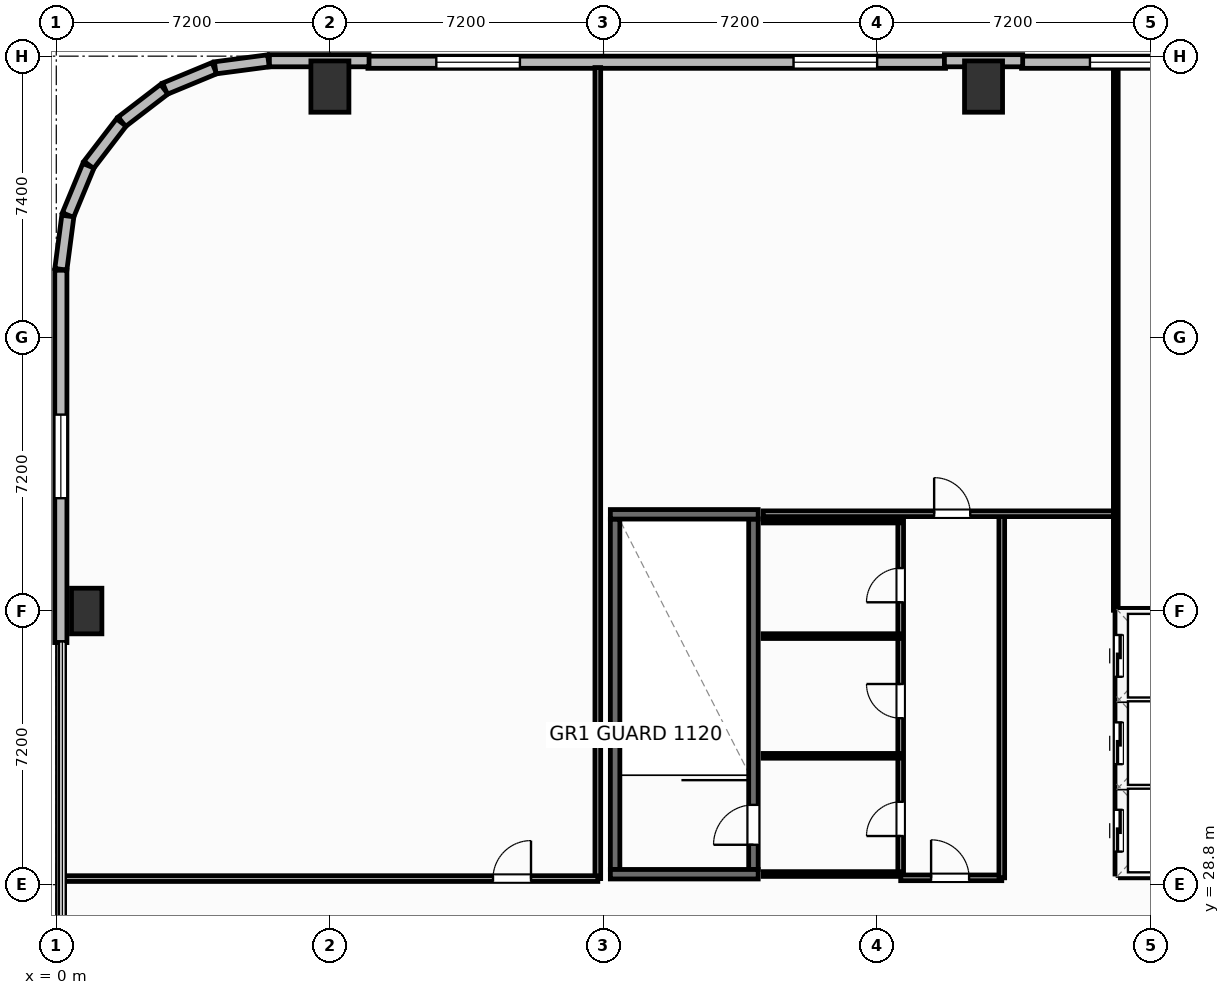
"""IFC4 building model, lengths in metres.
Left out: names, types, materials, properties, quantities, classifications, styles, units other than length and angle.
Written with IfcOpenShell. Run it as: python <this file> out.ifc"""

import sys

from ifc_helpers import new_model, si_unit, direction, frame, frame_2d, origin, origin_2d, place, context, subcontext, project, spatial, rectangle, extrude, element, fill, save


model = new_model("IFC4")
c1 = context("Model", 3, precision=1e-05, world=origin(), true_north=direction((0.0, 1.0)))
c2 = subcontext(c1, "Body", "Model", "MODEL_VIEW")
j1 = project(units=[si_unit("LENGTHUNIT", "METRE"), si_unit("PLANEANGLEUNIT", "RADIAN")], contexts=[c1])
p1 = place(None, origin())
s1 = spatial("IfcSite", under=j1, at=p1, CompositionType="ELEMENT")
p2 = place(p1, origin())
s2 = spatial("IfcBuilding", under=s1, at=p2, CompositionType="ELEMENT")
p3 = place(p2, frame((0.0, 0.0, 21.6)))
s3 = spatial("IfcBuildingStorey", under=s2, at=p3, CompositionType="ELEMENT", Elevation=21.6)
p4 = place(p3, frame((14.705, 29.2, 0.0), z_axis=(0.0, 0.0, 1.0), x_axis=(0.0, 1.0, 0.0)))
e1 = element("IfcWall", 1, at=p4, inside=s3, PredefinedType="SHEAR", context=c2, shape_type="SweptSolid", body=[
    extrude(rectangle(XDim=9.22, YDim=0.25, at=frame_2d((4.61, 0.0))), origin(), (0.0, 0.0, 1.0), 5.15),
])
p5 = place(p3, frame((18.345, 29.2, 0.0), z_axis=(0.0, 0.0, 1.0), x_axis=(0.0, 1.0, 0.0)))
e2 = element("IfcWall", 2, at=p5, inside=s3, PredefinedType="SHEAR", context=c2, shape_type="SweptSolid", body=[
    extrude(rectangle(XDim=9.22, YDim=0.25, at=frame_2d((4.61, 0.0))), origin(), (0.0, 0.0, 1.0), 5.15),
])
p6 = place(p5, frame((0.65, 0.0, 0.0)))
e3 = element("IfcOpeningElement", 3, at=p6, cuts=e2, PredefinedType="OPENING", context=c2, shape_type="SweptSolid", body=[
    extrude(rectangle(XDim=1.05, YDim=2.15, at=frame_2d((0.525, 1.075))), frame((0.0, 0.135, 0.0), z_axis=(0.0, -1.0, 0.0), x_axis=(1.0, 0.0, 0.0)), (0.0, 0.0, 1.0), 0.27),
])
for number, where, z_axis, x_axis in (
    (4, (14.58, 38.545, 0.0), (0.0, 0.0, 1.0), (1.0, 0.0, 0.0)),
    (5, (14.58, 29.075, 0.0), (0.0, 0.0, 1.0), (1.0, 0.0, 0.0)),
):
    element("IfcWall", number, at=place(p3, frame(where, z_axis=z_axis, x_axis=x_axis)), inside=s3, PredefinedType="SHEAR", context=c2, shape_type="SweptSolid", body=[
        extrude(rectangle(XDim=3.89, YDim=0.25, at=frame_2d((1.945, 0.0))), origin(), (0.0, 0.0, 1.0), 5.15),
    ])
for number, where, z_axis, x_axis in (
    (6, (7.2, 49.8, 0.0), (0.0, 0.0, 1.0), (1.0, 0.0, 0.0)),
    (7, (24.4, 49.8, 0.0), (0.0, 0.0, 1.0), (1.0, 0.0, 0.0)),
):
    element("IfcColumn", number, at=place(p3, frame(where, z_axis=z_axis, x_axis=x_axis)), inside=s3, PredefinedType="COLUMN", context=c2, shape_type="SweptSolid", body=[
        extrude(rectangle(XDim=1.0, YDim=1.35, at=origin_2d()), origin(), (0.0, 0.0, 1.0), 5.4),
    ])
p7 = place(p3, frame((0.8, 36.0, 0.0), z_axis=(0.0, 0.0, 1.0), x_axis=(1.0, 0.0, 0.0)))
e8 = element("IfcColumn", 8, at=p7, inside=s3, PredefinedType="PILASTER", context=c2, shape_type="SweptSolid", body=[
    extrude(rectangle(XDim=0.8, YDim=1.2, at=origin_2d()), origin(), (0.0, 0.0, 1.0), 5.4),
])
p8 = place(p3, frame((8.2, 50.44, 0.0), z_axis=(0.0, 0.0, 1.0), x_axis=(1.0, 0.0, 0.0)))
e9 = element("IfcWall", 9, at=p8, inside=s3, PredefinedType="SOLIDWALL", context=c2, shape_type="SweptSolid", body=[
    extrude(rectangle(XDim=15.2, YDim=0.32, at=frame_2d((7.6, 0.0))), origin(), (0.0, 0.0, 1.0), 4.1),
])
p9 = place(p8, frame((1.8, 0.0, 0.8)))
e10 = element("IfcOpeningElement", 10, at=p9, cuts=e9, PredefinedType="OPENING", context=c2, shape_type="SweptSolid", body=[
    extrude(rectangle(XDim=2.2, YDim=1.11, at=frame_2d((1.1, 0.555))), frame((0.0, 0.17, 0.0), z_axis=(0.0, -1.0, 0.0), x_axis=(1.0, 0.0, 0.0)), (0.0, 0.0, 1.0), 0.34),
])
p10 = place(p8, frame((11.2, 0.0, 0.8)))
e11 = element("IfcOpeningElement", 11, at=p10, cuts=e9, PredefinedType="OPENING", context=c2, shape_type="SweptSolid", body=[
    extrude(rectangle(XDim=2.2, YDim=1.11, at=frame_2d((1.1, 0.555))), frame((0.0, 0.17, 0.0), z_axis=(0.0, -1.0, 0.0), x_axis=(1.0, 0.0, 0.0)), (0.0, 0.0, 1.0), 0.34),
])
p11 = place(p3, frame((25.4, 50.44, 0.0), z_axis=(0.0, 0.0, 1.0), x_axis=(1.0, 0.0, 0.0)))
e12 = element("IfcWall", 12, at=p11, inside=s3, PredefinedType="SOLIDWALL", context=c2, shape_type="SweptSolid", body=[
    extrude(rectangle(XDim=27.6, YDim=0.32, at=frame_2d((13.8, 0.0))), origin(), (0.0, 0.0, 1.0), 4.1),
])
p12 = place(p11, frame((1.8, 0.0, 0.8)))
e13 = element("IfcOpeningElement", 13, at=p12, cuts=e12, PredefinedType="OPENING", context=c2, shape_type="SweptSolid", body=[
    extrude(rectangle(XDim=2.2, YDim=1.11, at=frame_2d((1.1, 0.555))), frame((0.0, 0.17, 0.0), z_axis=(0.0, -1.0, 0.0), x_axis=(1.0, 0.0, 0.0)), (0.0, 0.0, 1.0), 0.34),
])
p13 = place(p11, frame((23.6, 0.0, 0.8)))
e14 = element("IfcOpeningElement", 14, at=p13, cuts=e12, PredefinedType="OPENING", context=c2, shape_type="SweptSolid", body=[
    extrude(rectangle(XDim=2.2, YDim=1.11, at=frame_2d((1.1, 0.555))), frame((0.0, 0.17, 0.0), z_axis=(0.0, -1.0, 0.0), x_axis=(1.0, 0.0, 0.0)), (0.0, 0.0, 1.0), 0.34),
])
p14 = place(p3, frame((25.43, 50.48, 0.0), z_axis=(0.0, 0.0, 1.0), x_axis=(-1.0, 0.0, 0.0)))
e15 = element("IfcWall", 15, at=p14, inside=s3, PredefinedType="SOLIDWALL", context=c2, shape_type="SweptSolid", body=[
    extrude(rectangle(XDim=2.06, YDim=0.32, at=frame_2d((1.03, 0.0))), origin(), (0.0, 0.0, 1.0), 4.1),
])
p15 = place(p3, frame((8.23, 50.48, 0.0), z_axis=(0.0, 0.0, 1.0), x_axis=(-1.0, 0.0, 0.0)))
e16 = element("IfcWall", 16, at=p15, inside=s3, PredefinedType="SOLIDWALL", context=c2, shape_type="SweptSolid", body=[
    extrude(rectangle(XDim=2.622, YDim=0.32, at=frame_2d((1.311, 0.0))), origin(), (0.0, 0.0, 1.0), 4.1),
])
p16 = place(p3, frame((5.583, 50.477, 0.0), z_axis=(0.0, 0.0, 1.0), x_axis=(-0.991434880626, -0.130601981138, 0.0)))
e17 = element("IfcWall", 17, at=p16, inside=s3, PredefinedType="SOLIDWALL", context=c2, shape_type="SweptSolid", body=[
    extrude(rectangle(XDim=1.413, YDim=0.32, at=frame_2d((0.707, 0.0))), origin(), (0.0, 0.0, 1.0), 4.1),
])
p17 = place(p3, frame((4.159, 50.283, 0.0), z_axis=(0.0, 0.0, 1.0), x_axis=(-0.923841042178, -0.382776343035, 0.0)))
e18 = element("IfcWall", 18, at=p17, inside=s3, PredefinedType="SOLIDWALL", context=c2, shape_type="SweptSolid", body=[
    extrude(rectangle(XDim=1.405, YDim=0.32, at=frame_2d((0.703, 0.0))), origin(), (0.0, 0.0, 1.0), 4.1),
])
p18 = place(p3, frame((2.841, 49.73, 0.0), z_axis=(0.0, 0.0, 1.0), x_axis=(-0.79338541907, -0.60871962085, 0.0)))
e19 = element("IfcWall", 19, at=p18, inside=s3, PredefinedType="SOLIDWALL", context=c2, shape_type="SweptSolid", body=[
    extrude(rectangle(XDim=1.405, YDim=0.32, at=frame_2d((0.703, 0.0))), origin(), (0.0, 0.0, 1.0), 4.1),
])
p19 = place(p3, frame((1.711, 48.854, 0.0), z_axis=(0.0, 0.0, 1.0), x_axis=(-0.608828954222, -0.793301521807, 0.0)))
e20 = element("IfcWall", 20, at=p19, inside=s3, PredefinedType="SOLIDWALL", context=c2, shape_type="SweptSolid", body=[
    extrude(rectangle(XDim=1.406, YDim=0.32, at=frame_2d((0.703, 0.0))), origin(), (0.0, 0.0, 1.0), 4.1),
])
p20 = place(p3, frame((0.846, 47.716, 0.0), z_axis=(0.0, 0.0, 1.0), x_axis=(-0.382924622758, -0.923779591291, 0.0)))
e21 = element("IfcWall", 21, at=p20, inside=s3, PredefinedType="SOLIDWALL", context=c2, shape_type="SweptSolid", body=[
    extrude(rectangle(XDim=1.405, YDim=0.32, at=frame_2d((0.703, 0.0))), origin(), (0.0, 0.0, 1.0), 4.1),
])
p21 = place(p3, frame((0.304, 46.393, 0.0), z_axis=(0.0, 0.0, 1.0), x_axis=(-0.130432168094, -0.991457235349, 0.0)))
e22 = element("IfcWall", 22, at=p21, inside=s3, PredefinedType="SOLIDWALL", context=c2, shape_type="SweptSolid", body=[
    extrude(rectangle(XDim=1.413, YDim=0.32, at=frame_2d((0.707, 0.0))), origin(), (0.0, 0.0, 1.0), 4.1),
])
p22 = place(p3, frame((0.12, 44.967, 0.0), z_axis=(0.0, 0.0, 1.0), x_axis=(0.0, -1.0, 0.0)))
e23 = element("IfcWall", 23, at=p22, inside=s3, PredefinedType="SOLIDWALL", context=c2, shape_type="SweptSolid", body=[
    extrude(rectangle(XDim=9.797, YDim=0.32, at=frame_2d((4.898, 0.0))), origin(), (0.0, 0.0, 1.0), 4.1),
])
p23 = place(p22, frame((3.799, 0.0, 0.8)))
e24 = element("IfcOpeningElement", 24, at=p23, cuts=e23, PredefinedType="OPENING", context=c2, shape_type="SweptSolid", body=[
    extrude(rectangle(XDim=2.2, YDim=2.0, at=frame_2d((1.1, 1.0))), frame((0.0, 0.17, 0.0), z_axis=(0.0, -1.0, 0.0), x_axis=(1.0, 0.0, 0.0)), (0.0, 0.0, 1.0), 0.34),
])
p24 = place(p3, frame((22.22, 28.98, 0.0), z_axis=(0.0, 0.0, 1.0), x_axis=(1.0, 0.0, 0.0)))
e25 = element("IfcWall", 25, at=p24, inside=s3, PredefinedType="PARTITIONING", context=c2, shape_type="SweptSolid", body=[
    extrude(rectangle(XDim=2.66, YDim=0.15, at=frame_2d((1.33, 0.0))), origin(), (0.0, 0.0, 1.0), 5.15),
])
p25 = place(p24, frame((0.8, 0.0, 0.0)))
e26 = element("IfcOpeningElement", 26, at=p25, cuts=e25, PredefinedType="OPENING", context=c2, shape_type="SweptSolid", body=[
    extrude(rectangle(XDim=1.0, YDim=2.05, at=frame_2d((0.5, 1.025))), frame((0.0, 0.085, 0.0), z_axis=(0.0, -1.0, 0.0), x_axis=(1.0, 0.0, 0.0)), (0.0, 0.0, 1.0), 0.17),
])
p26 = place(p3, frame((24.88, 28.98, 0.0), z_axis=(0.0, 0.0, 1.0), x_axis=(0.0, 1.0, 0.0)))
e27 = element("IfcWall", 27, at=p26, inside=s3, PredefinedType="PARTITIONING", context=c2, shape_type="SweptSolid", body=[
    extrude(rectangle(XDim=9.58, YDim=0.15, at=frame_2d((4.79, 0.0))), origin(), (0.0, 0.0, 1.0), 5.15),
])
p27 = place(p3, frame((22.22, 29.08, 0.0), z_axis=(0.0, 0.0, 1.0), x_axis=(0.0, 1.0, 0.0)))
e28 = element("IfcWall", 28, at=p27, inside=s3, PredefinedType="PARTITIONING", context=c2, shape_type="SweptSolid", body=[
    extrude(rectangle(XDim=9.3, YDim=0.15, at=frame_2d((4.65, 0.0))), origin(), (0.0, 0.0, 1.0), 5.15),
])
p28 = place(p27, frame((1.0, 0.0, 0.0)))
e29 = element("IfcOpeningElement", 29, at=p28, cuts=e28, PredefinedType="OPENING", context=c2, shape_type="SweptSolid", body=[
    extrude(rectangle(XDim=0.9, YDim=2.05, at=frame_2d((0.45, 1.025))), frame((0.0, 0.085, 0.0), z_axis=(0.0, -1.0, 0.0), x_axis=(1.0, 0.0, 0.0)), (0.0, 0.0, 1.0), 0.17),
])
p29 = place(p27, frame((4.1, 0.0, 0.0)))
e30 = element("IfcOpeningElement", 30, at=p29, cuts=e28, PredefinedType="OPENING", context=c2, shape_type="SweptSolid", body=[
    extrude(rectangle(XDim=0.9, YDim=2.05, at=frame_2d((0.45, 1.025))), frame((0.0, 0.085, 0.0), z_axis=(0.0, -1.0, 0.0), x_axis=(1.0, 0.0, 0.0)), (0.0, 0.0, 1.0), 0.17),
])
p30 = place(p27, frame((7.15, 0.0, 0.0)))
e31 = element("IfcOpeningElement", 31, at=p30, cuts=e28, PredefinedType="OPENING", context=c2, shape_type="SweptSolid", body=[
    extrude(rectangle(XDim=0.9, YDim=2.05, at=frame_2d((0.45, 1.025))), frame((0.0, 0.085, 0.0), z_axis=(0.0, -1.0, 0.0), x_axis=(1.0, 0.0, 0.0)), (0.0, 0.0, 1.0), 0.17),
])
for number, where, z_axis, x_axis in (
    (32, (18.6, 29.08, 0.0), (0.0, 0.0, 1.0), (1.0, 0.0, 0.0)),
    (33, (18.6, 32.19, 0.0), (0.0, 0.0, 1.0), (1.0, 0.0, 0.0)),
    (34, (18.6, 35.34, 0.0), (0.0, 0.0, 1.0), (1.0, 0.0, 0.0)),
    (35, (18.6, 38.38, 0.0), (0.0, 0.0, 1.0), (1.0, 0.0, 0.0)),
):
    element("IfcWall", number, at=place(p3, frame(where, z_axis=z_axis, x_axis=x_axis)), inside=s3, PredefinedType="PARTITIONING", context=c2, shape_type="SweptSolid", body=[
        extrude(rectangle(XDim=3.62, YDim=0.125, at=frame_2d((1.81, 0.0))), origin(), (0.0, 0.0, 1.0), 5.15),
    ])
p31 = place(p3, frame((18.6, 38.56, 0.0), z_axis=(0.0, 0.0, 1.0), x_axis=(1.0, 0.0, 0.0)))
e36 = element("IfcWall", 36, at=p31, inside=s3, PredefinedType="PARTITIONING", context=c2, shape_type="SweptSolid", body=[
    extrude(rectangle(XDim=9.28, YDim=0.15, at=frame_2d((4.64, 0.0))), origin(), (0.0, 0.0, 1.0), 5.15),
])
p32 = place(p31, frame((4.5, 0.0, 0.0)))
e37 = element("IfcOpeningElement", 37, at=p32, cuts=e36, PredefinedType="OPENING", context=c2, shape_type="SweptSolid", body=[
    extrude(rectangle(XDim=0.95, YDim=2.05, at=frame_2d((0.475, 1.025))), frame((0.0, 0.085, 0.0), z_axis=(0.0, -1.0, 0.0), x_axis=(1.0, 0.0, 0.0)), (0.0, 0.0, 1.0), 0.17),
])
p33 = place(p3, frame((27.88, 36.02, 0.0), z_axis=(0.0, 0.0, 1.0), x_axis=(0.0, 1.0, 0.0)))
e38 = element("IfcWall", 38, at=p33, inside=s3, PredefinedType="PARTITIONING", context=c2, shape_type="SweptSolid", body=[
    extrude(rectangle(XDim=14.18, YDim=0.125, at=frame_2d((7.09, 0.0))), origin(), (0.0, 0.0, 1.0), 5.15),
])
p34 = place(p3, frame((14.25, 28.96, 0.0), z_axis=(0.0, 0.0, 1.0), x_axis=(0.0, 1.0, 0.0)))
e39 = element("IfcWall", 39, at=p34, inside=s3, PredefinedType="PARTITIONING", context=c2, shape_type="SweptSolid", body=[
    extrude(rectangle(XDim=21.34, YDim=0.15, at=frame_2d((10.67, 0.0))), origin(), (0.0, 0.0, 1.0), 5.15),
])
p35 = place(p3, frame((0.2, 28.96, 0.0), z_axis=(0.0, 0.0, 1.0), x_axis=(1.0, 0.0, 0.0)))
e40 = element("IfcWall", 40, at=p35, inside=s3, PredefinedType="PARTITIONING", context=c2, shape_type="SweptSolid", body=[
    extrude(rectangle(XDim=14.05, YDim=0.15, at=frame_2d((7.025, 0.0))), origin(), (0.0, 0.0, 1.0), 5.15),
])
p36 = place(p35, frame((11.292, 0.0, 0.0)))
e41 = element("IfcOpeningElement", 41, at=p36, cuts=e40, PredefinedType="OPENING", context=c2, shape_type="SweptSolid", body=[
    extrude(rectangle(XDim=1.0, YDim=2.05, at=frame_2d((0.5, 1.025))), frame((0.0, 0.085, 0.0), z_axis=(0.0, -1.0, 0.0), x_axis=(1.0, 0.0, 0.0)), (0.0, 0.0, 1.0), 0.17),
])
for number, where, z_axis, x_axis in (
    (42, (28.02, 31.375, 0.0), (0.0, 0.0, 1.0), (1.0, 0.0, 0.0)),
    (43, (28.02, 33.675, 0.0), (0.0, 0.0, 1.0), (1.0, 0.0, 0.0)),
):
    element("IfcWall", number, at=place(p3, frame(where, z_axis=z_axis, x_axis=x_axis)), inside=s3, PredefinedType="PARTITIONING", context=c2, shape_type="SweptSolid", body=[
        extrude(rectangle(XDim=2.06, YDim=0.2, at=frame_2d((1.03, 0.0))), origin(), (0.0, 0.0, 1.0), 5.15),
    ])
for number, where, z_axis, x_axis in (
    (44, (28.0, 29.08, 0.0), (0.0, 0.0, 1.0), (1.0, 0.0, 0.0)),
    (45, (28.0, 35.97, 0.0), (0.0, 0.0, 1.0), (1.0, 0.0, 0.0)),
):
    element("IfcWall", number, at=place(p3, frame(where, z_axis=z_axis, x_axis=x_axis)), inside=s3, PredefinedType="PARTITIONING", context=c2, shape_type="SweptSolid", body=[
        extrude(rectangle(XDim=2.1, YDim=0.2, at=frame_2d((1.05, 0.0))), origin(), (0.0, 0.0, 1.0), 5.15),
    ])
p37 = place(p3, frame((27.96, 29.08, 0.0), z_axis=(0.0, 0.0, 1.0), x_axis=(0.0, 1.0, 0.0)))
e46 = element("IfcWall", 46, at=p37, inside=s3, PredefinedType="PARTITIONING", context=c2, shape_type="SweptSolid", body=[
    extrude(rectangle(XDim=6.89, YDim=0.2, at=frame_2d((3.445, 0.0))), origin(), (0.0, 0.0, 1.0), 5.15),
])
p38 = place(p37, frame((0.59, 0.0, 0.0)))
e47 = element("IfcOpeningElement", 47, at=p38, cuts=e46, PredefinedType="OPENING", context=c2, shape_type="SweptSolid", body=[
    extrude(rectangle(XDim=1.1, YDim=2.15, at=frame_2d((0.55, 1.075))), frame((0.0, 0.11, 0.0), z_axis=(0.0, -1.0, 0.0), x_axis=(1.0, 0.0, 0.0)), (0.0, 0.0, 1.0), 0.22),
])
p39 = place(p37, frame((2.89, 0.0, 0.0)))
e48 = element("IfcOpeningElement", 48, at=p39, cuts=e46, PredefinedType="OPENING", context=c2, shape_type="SweptSolid", body=[
    extrude(rectangle(XDim=1.1, YDim=2.15, at=frame_2d((0.55, 1.075))), frame((0.0, 0.11, 0.0), z_axis=(0.0, -1.0, 0.0), x_axis=(1.0, 0.0, 0.0)), (0.0, 0.0, 1.0), 0.22),
])
p40 = place(p37, frame((5.19, 0.0, 0.0)))
e49 = element("IfcOpeningElement", 49, at=p40, cuts=e46, PredefinedType="OPENING", context=c2, shape_type="SweptSolid", body=[
    extrude(rectangle(XDim=1.1, YDim=2.15, at=frame_2d((0.55, 1.075))), frame((0.0, 0.11, 0.0), z_axis=(0.0, -1.0, 0.0), x_axis=(1.0, 0.0, 0.0)), (0.0, 0.0, 1.0), 0.22),
])
p41 = place(p9, origin())
e50 = element("IfcWindow", 50, at=p41, inside=s3, PartitioningType="SINGLE_PANEL", PredefinedType="WINDOW", context=c2, shape_type="SweptSolid", body=[
    extrude(rectangle(XDim=2.2, YDim=1.11, at=frame_2d((1.1, 0.555))), frame((0.0, 0.03, 0.0), z_axis=(0.0, -1.0, 0.0), x_axis=(1.0, 0.0, 0.0)), (0.0, 0.0, 1.0), 0.06),
])
fill(e10, e50)
p42 = place(p10, origin())
e51 = element("IfcWindow", 51, at=p42, inside=s3, PartitioningType="SINGLE_PANEL", PredefinedType="WINDOW", context=c2, shape_type="SweptSolid", body=[
    extrude(rectangle(XDim=2.2, YDim=1.11, at=frame_2d((1.1, 0.555))), frame((0.0, 0.03, 0.0), z_axis=(0.0, -1.0, 0.0), x_axis=(1.0, 0.0, 0.0)), (0.0, 0.0, 1.0), 0.06),
])
fill(e11, e51)
p43 = place(p12, origin())
e52 = element("IfcWindow", 52, at=p43, inside=s3, PartitioningType="SINGLE_PANEL", PredefinedType="WINDOW", context=c2, shape_type="SweptSolid", body=[
    extrude(rectangle(XDim=2.2, YDim=1.11, at=frame_2d((1.1, 0.555))), frame((0.0, 0.03, 0.0), z_axis=(0.0, -1.0, 0.0), x_axis=(1.0, 0.0, 0.0)), (0.0, 0.0, 1.0), 0.06),
])
fill(e13, e52)
p44 = place(p23, origin())
e53 = element("IfcWindow", 53, at=p44, inside=s3, PartitioningType="SINGLE_PANEL", PredefinedType="WINDOW", context=c2, shape_type="SweptSolid", body=[
    extrude(rectangle(XDim=2.2, YDim=2.0, at=frame_2d((1.1, 1.0))), frame((0.0, 0.03, 0.0), z_axis=(0.0, -1.0, 0.0), x_axis=(1.0, 0.0, 0.0)), (0.0, 0.0, 1.0), 0.06),
])
fill(e24, e53)
p45 = place(p25, origin())
e54 = element("IfcDoor", 54, at=p45, inside=s3, OperationType="SINGLE_SWING_LEFT", PredefinedType="DOOR", context=c2, shape_type="SweptSolid", body=[
    extrude(rectangle(XDim=1.0, YDim=2.05, at=frame_2d((0.5, 1.025))), frame((0.0, 0.025, 0.0), z_axis=(0.0, -1.0, 0.0), x_axis=(1.0, 0.0, 0.0)), (0.0, 0.0, 1.0), 0.05),
])
fill(e26, e54)
p46 = place(p28, origin())
e55 = element("IfcDoor", 55, at=p46, inside=s3, OperationType="SINGLE_SWING_LEFT", PredefinedType="DOOR", context=c2, shape_type="SweptSolid", body=[
    extrude(rectangle(XDim=0.9, YDim=2.05, at=frame_2d((0.45, 1.025))), frame((0.0, 0.025, 0.0), z_axis=(0.0, -1.0, 0.0), x_axis=(1.0, 0.0, 0.0)), (0.0, 0.0, 1.0), 0.05),
])
fill(e29, e55)
p47 = place(p29, origin())
e56 = element("IfcDoor", 56, at=p47, inside=s3, OperationType="SINGLE_SWING_RIGHT", PredefinedType="DOOR", context=c2, shape_type="SweptSolid", body=[
    extrude(rectangle(XDim=0.9, YDim=2.05, at=frame_2d((0.45, 1.025))), frame((0.0, 0.025, 0.0), z_axis=(0.0, -1.0, 0.0), x_axis=(1.0, 0.0, 0.0)), (0.0, 0.0, 1.0), 0.05),
])
fill(e30, e56)
p48 = place(p30, origin())
e57 = element("IfcDoor", 57, at=p48, inside=s3, OperationType="SINGLE_SWING_LEFT", PredefinedType="DOOR", context=c2, shape_type="SweptSolid", body=[
    extrude(rectangle(XDim=0.9, YDim=2.05, at=frame_2d((0.45, 1.025))), frame((0.0, 0.025, 0.0), z_axis=(0.0, -1.0, 0.0), x_axis=(1.0, 0.0, 0.0)), (0.0, 0.0, 1.0), 0.05),
])
fill(e31, e57)
p49 = place(p32, origin())
e58 = element("IfcDoor", 58, at=p49, inside=s3, OperationType="SINGLE_SWING_LEFT", PredefinedType="DOOR", context=c2, shape_type="SweptSolid", body=[
    extrude(rectangle(XDim=0.95, YDim=2.05, at=frame_2d((0.475, 1.025))), frame((0.0, 0.025, 0.0), z_axis=(0.0, -1.0, 0.0), x_axis=(1.0, 0.0, 0.0)), (0.0, 0.0, 1.0), 0.05),
])
fill(e37, e58)
p50 = place(p36, origin())
e59 = element("IfcDoor", 59, at=p50, inside=s3, OperationType="SINGLE_SWING_RIGHT", PredefinedType="DOOR", context=c2, shape_type="SweptSolid", body=[
    extrude(rectangle(XDim=1.0, YDim=2.05, at=frame_2d((0.5, 1.025))), frame((0.0, 0.025, 0.0), z_axis=(0.0, -1.0, 0.0), x_axis=(1.0, 0.0, 0.0)), (0.0, 0.0, 1.0), 0.05),
])
fill(e41, e59)
p51 = place(p6, origin())
e60 = element("IfcDoor", 60, at=p51, inside=s3, OperationType="SINGLE_SWING_LEFT", PredefinedType="DOOR", context=c2, shape_type="SweptSolid", body=[
    extrude(rectangle(XDim=1.05, YDim=2.15, at=frame_2d((0.525, 1.075))), frame((0.0, 0.025, 0.0), z_axis=(0.0, -1.0, 0.0), x_axis=(1.0, 0.0, 0.0)), (0.0, 0.0, 1.0), 0.05),
])
fill(e3, e60)
p52 = place(p38, origin())
e61 = element("IfcDoor", 61, at=p52, inside=s3, OperationType="SLIDING_TO_LEFT", PredefinedType="DOOR", context=c2, shape_type="SweptSolid", body=[
    extrude(rectangle(XDim=1.1, YDim=2.15, at=frame_2d((0.55, 1.075))), frame((0.0, 0.025, 0.0), z_axis=(0.0, -1.0, 0.0), x_axis=(1.0, 0.0, 0.0)), (0.0, 0.0, 1.0), 0.05),
])
fill(e47, e61)
p53 = place(p39, origin())
e62 = element("IfcDoor", 62, at=p53, inside=s3, OperationType="SLIDING_TO_LEFT", PredefinedType="DOOR", context=c2, shape_type="SweptSolid", body=[
    extrude(rectangle(XDim=1.1, YDim=2.15, at=frame_2d((0.55, 1.075))), frame((0.0, 0.025, 0.0), z_axis=(0.0, -1.0, 0.0), x_axis=(1.0, 0.0, 0.0)), (0.0, 0.0, 1.0), 0.05),
])
fill(e48, e62)
p54 = place(p40, origin())
e63 = element("IfcDoor", 63, at=p54, inside=s3, OperationType="SLIDING_TO_LEFT", PredefinedType="DOOR", context=c2, shape_type="SweptSolid", body=[
    extrude(rectangle(XDim=1.1, YDim=2.15, at=frame_2d((0.55, 1.075))), frame((0.0, 0.025, 0.0), z_axis=(0.0, -1.0, 0.0), x_axis=(1.0, 0.0, 0.0)), (0.0, 0.0, 1.0), 0.05),
])
fill(e49, e63)
save(model, sys.argv[1])
